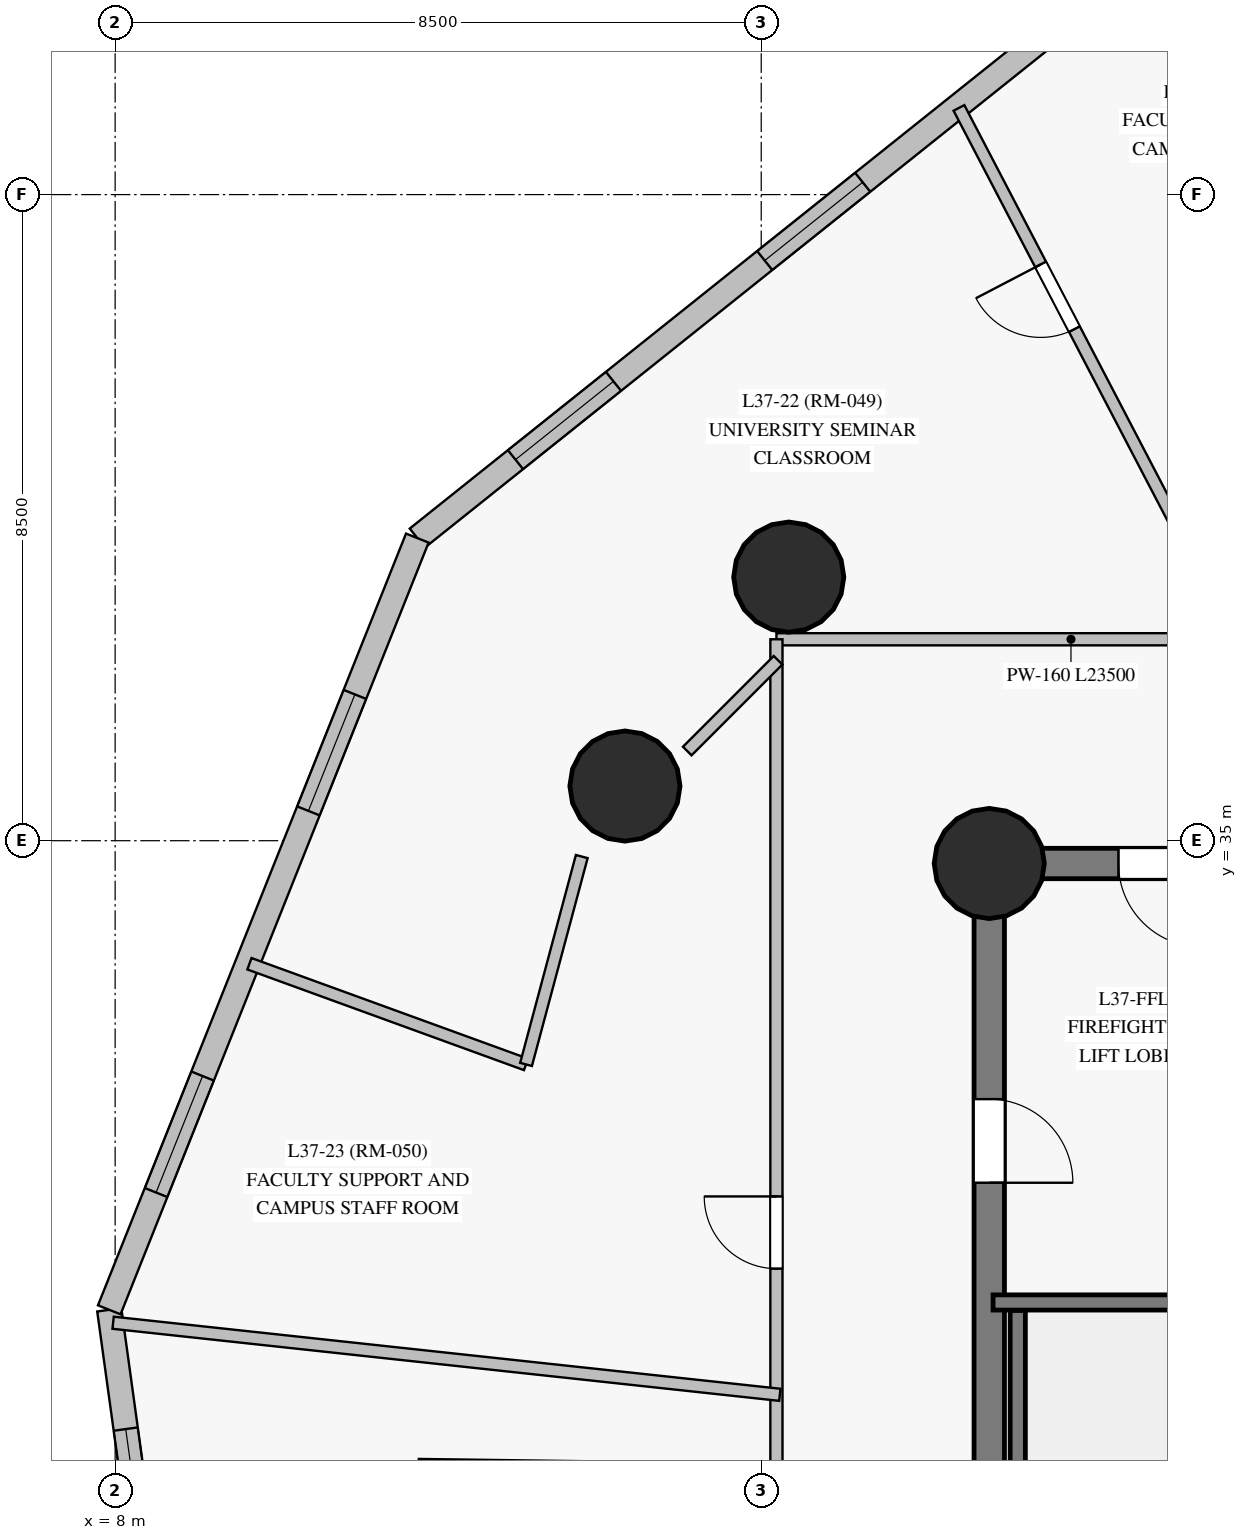
"""IFC4 building model, lengths in metres.
Left out: names, types, materials, properties, quantities, classifications, styles, units other than length and angle.
Written with IfcOpenShell. Run it as: python <this file> out.ifc"""

import sys

from ifc_helpers import new_model, si_unit, direction, frame, frame_2d, origin, origin_with_axes, origin_2d, place, context, subcontext, project, spatial, rectangle, circle, extrude, source, transform, mapped, element, fill, save


model = new_model("IFC4")
c1 = context("Model", 3, precision=1e-05, world=origin(), true_north=direction((0.0, 1.0)))
c2 = subcontext(c1, "Body", "Model", "MODEL_VIEW")
j1 = project(units=[si_unit("LENGTHUNIT", "METRE"), si_unit("PLANEANGLEUNIT", "RADIAN")], contexts=[c1])
p1 = place(None, origin())
s1 = spatial("IfcSite", under=j1, at=p1, CompositionType="ELEMENT")
p2 = place(p1, origin())
s2 = spatial("IfcBuilding", under=s1, at=p2, CompositionType="ELEMENT")
p3 = place(p2, frame((0.0, 0.0, 132.8)))
s3 = spatial("IfcBuildingStorey", under=s2, at=p3, CompositionType="ELEMENT", Elevation=132.8)
p4 = place(p3, frame((26.55, 34.7, 0.0), z_axis=(0.0, 0.0, 1.0), x_axis=(-1.0, 0.0, 0.0)))
e1 = element("IfcWall", 1, at=p4, inside=s3, PredefinedType="SHEAR", context=c2, shape_type="SweptSolid", body=[
    extrude(rectangle(XDim=7.05, YDim=0.4, at=frame_2d((3.525, 0.0))), origin(), (0.0, 0.0, 1.0), 2.825),
])
p5 = place(p4, frame((4.25, 0.0, 0.0)))
e2 = element("IfcOpeningElement", 2, at=p5, cuts=e1, PredefinedType="OPENING", context=c2, shape_type="SweptSolid", body=[
    extrude(rectangle(XDim=1.1, YDim=2.15, at=frame_2d((0.55, 1.075))), frame((0.0, 0.21, 0.0), z_axis=(0.0, -1.0, 0.0), x_axis=(1.0, 0.0, 0.0)), (0.0, 0.0, 1.0), 0.42),
])
p6 = place(p3, frame((19.5, 34.7, 0.0), z_axis=(0.0, 0.0, 1.0), x_axis=(0.0, -1.0, 0.0)))
e3 = element("IfcWall", 3, at=p6, inside=s3, PredefinedType="SHEAR", context=c2, shape_type="SweptSolid", body=[
    extrude(rectangle(XDim=16.4, YDim=0.4, at=frame_2d((8.2, 0.0))), origin(), (0.0, 0.0, 1.0), 2.825),
])
p7 = place(p6, frame((3.1, 0.0, 0.0)))
e4 = element("IfcOpeningElement", 4, at=p7, cuts=e3, PredefinedType="OPENING", context=c2, shape_type="SweptSolid", body=[
    extrude(rectangle(XDim=1.1, YDim=2.15, at=frame_2d((0.55, 1.075))), frame((0.0, 0.21, 0.0), z_axis=(0.0, -1.0, 0.0), x_axis=(1.0, 0.0, 0.0)), (0.0, 0.0, 1.0), 0.42),
])
m1 = source(origin_with_axes(), c2, "Body", "SweptSolid", [
    extrude(circle(Radius=0.725, at=origin_2d()), origin(), (0.0, 0.0, 1.0), 3.05),
])
for number, where, z_axis, x_axis in (
    (5, (19.5, 34.7, 0.0), (0.0, 0.0, 1.0), (1.0, 0.0, 0.0)),
    (6, (16.862, 38.468, 0.0), (0.0, 0.0, 1.0), (1.0, 0.0, 0.0)),
    (7, (14.707, 35.719, 0.0), (0.0, 0.0, 1.0), (1.0, 0.0, 0.0)),
):
    element("IfcColumn", number, at=place(p3, frame(where, z_axis=z_axis, x_axis=x_axis)), inside=s3, PredefinedType="COLUMN", context=c2, shape_type="MappedRepresentation", body=[
        mapped(m1, transform((0.0, 0.0, 0.0), scale=1.0)),
    ])
p8 = place(p3, frame((7.923, 28.828, 0.0), z_axis=(0.0, 0.0, 1.0), x_axis=(0.136771186791, -0.990602666291, 0.0)))
e8 = element("IfcWall", 8, at=p8, inside=s3, PredefinedType="SOLIDWALL", context=c2, shape_type="SweptSolid", body=[
    extrude(rectangle(XDim=13.646, YDim=0.32, at=frame_2d((6.823, 0.0))), origin(), (0.0, 0.0, 1.0), 2.825),
])
p9 = place(p8, frame((1.584, 0.0, 0.85)))
e9 = element("IfcOpeningElement", 9, at=p9, cuts=e8, PredefinedType="OPENING", context=c2, shape_type="SweptSolid", body=[
    extrude(rectangle(XDim=1.65, YDim=1.65, at=frame_2d((0.825, 0.825))), frame((0.0, 0.17, 0.0), z_axis=(0.0, -1.0, 0.0), x_axis=(1.0, 0.0, 0.0)), (0.0, 0.0, 1.0), 0.34),
])
p10 = place(p8, frame((5.394, 0.0, 0.85)))
e10 = element("IfcOpeningElement", 10, at=p10, cuts=e8, PredefinedType="OPENING", context=c2, shape_type="SweptSolid", body=[
    extrude(rectangle(XDim=1.65, YDim=1.65, at=frame_2d((0.825, 0.825))), frame((0.0, 0.17, 0.0), z_axis=(0.0, -1.0, 0.0), x_axis=(1.0, 0.0, 0.0)), (0.0, 0.0, 1.0), 0.34),
])
p11 = place(p8, frame((9.204, 0.0, 0.85)))
e11 = element("IfcOpeningElement", 11, at=p11, cuts=e8, PredefinedType="OPENING", context=c2, shape_type="SweptSolid", body=[
    extrude(rectangle(XDim=1.65, YDim=1.65, at=frame_2d((0.825, 0.825))), frame((0.0, 0.17, 0.0), z_axis=(0.0, -1.0, 0.0), x_axis=(1.0, 0.0, 0.0)), (0.0, 0.0, 1.0), 0.34),
])
p12 = place(p3, frame((22.637, 47.499, 0.0), z_axis=(0.0, 0.0, 1.0), x_axis=(-0.781301477926, -0.624153827667, 0.0)))
e12 = element("IfcWall", 12, at=p12, inside=s3, PredefinedType="SOLIDWALL", context=c2, shape_type="SweptSolid", body=[
    extrude(rectangle(XDim=13.646, YDim=0.32, at=frame_2d((6.823, 0.0))), origin(), (0.0, 0.0, 1.0), 2.825),
])
p13 = place(p12, frame((1.482, 0.0, 0.85)))
e13 = element("IfcOpeningElement", 13, at=p13, cuts=e12, PredefinedType="OPENING", context=c2, shape_type="SweptSolid", body=[
    extrude(rectangle(XDim=1.65, YDim=1.65, at=frame_2d((0.825, 0.825))), frame((0.0, 0.17, 0.0), z_axis=(0.0, -1.0, 0.0), x_axis=(1.0, 0.0, 0.0)), (0.0, 0.0, 1.0), 0.34),
])
p14 = place(p12, frame((6.147, 0.0, 0.85)))
e14 = element("IfcOpeningElement", 14, at=p14, cuts=e12, PredefinedType="OPENING", context=c2, shape_type="SweptSolid", body=[
    extrude(rectangle(XDim=1.65, YDim=1.65, at=frame_2d((0.825, 0.825))), frame((0.0, 0.17, 0.0), z_axis=(0.0, -1.0, 0.0), x_axis=(1.0, 0.0, 0.0)), (0.0, 0.0, 1.0), 0.34),
])
p15 = place(p12, frame((10.343, 0.0, 0.85)))
e15 = element("IfcOpeningElement", 15, at=p15, cuts=e12, PredefinedType="OPENING", context=c2, shape_type="SweptSolid", body=[
    extrude(rectangle(XDim=1.65, YDim=1.65, at=frame_2d((0.825, 0.825))), frame((0.0, 0.17, 0.0), z_axis=(0.0, -1.0, 0.0), x_axis=(1.0, 0.0, 0.0)), (0.0, 0.0, 1.0), 0.34),
])
p16 = place(p3, frame((11.975, 38.981, 0.0), z_axis=(0.0, 0.0, 1.0), x_axis=(-0.370728292026, -0.928741370615, 0.0)))
e16 = element("IfcWall", 16, at=p16, inside=s3, PredefinedType="SOLIDWALL", context=c2, shape_type="SweptSolid", body=[
    extrude(rectangle(XDim=10.932, YDim=0.32, at=frame_2d((5.466, 0.0))), origin(), (0.0, 0.0, 1.0), 2.825),
])
p17 = place(p16, frame((2.215, 0.0, 0.85)))
e17 = element("IfcOpeningElement", 17, at=p17, cuts=e16, PredefinedType="OPENING", context=c2, shape_type="SweptSolid", body=[
    extrude(rectangle(XDim=1.65, YDim=1.65, at=frame_2d((0.825, 0.825))), frame((0.0, 0.17, 0.0), z_axis=(0.0, -1.0, 0.0), x_axis=(1.0, 0.0, 0.0)), (0.0, 0.0, 1.0), 0.34),
])
p18 = place(p16, frame((7.62, 0.0, 0.85)))
e18 = element("IfcOpeningElement", 18, at=p18, cuts=e16, PredefinedType="OPENING", context=c2, shape_type="SweptSolid", body=[
    extrude(rectangle(XDim=1.65, YDim=1.65, at=frame_2d((0.825, 0.825))), frame((0.0, 0.17, 0.0), z_axis=(0.0, -1.0, 0.0), x_axis=(1.0, 0.0, 0.0)), (0.0, 0.0, 1.0), 0.34),
])
p19 = place(p3, frame((19.875, 21.32, 0.0), z_axis=(0.0, 0.0, 1.0), x_axis=(0.0, 1.0, 0.0)))
e19 = element("IfcWall", 19, at=p19, inside=s3, PredefinedType="SHEAR", context=c2, shape_type="SweptSolid", body=[
    extrude(rectangle(XDim=7.5, YDim=0.2, at=frame_2d((3.75, 0.0))), origin(), (0.0, 0.0, 1.0), 2.825),
])
p20 = place(p3, frame((19.55, 28.925, 0.0), z_axis=(0.0, 0.0, 1.0), x_axis=(1.0, 0.0, 0.0)))
e20 = element("IfcWall", 20, at=p20, inside=s3, PredefinedType="SHEAR", context=c2, shape_type="SweptSolid", body=[
    extrude(rectangle(XDim=3.995, YDim=0.2, at=frame_2d((1.998, 0.0))), origin(), (0.0, 0.0, 1.0), 2.825),
])
p21 = place(p3, frame((16.7, 37.65, 0.0), z_axis=(0.0, 0.0, 1.0), x_axis=(1.0, 0.0, 0.0)))
e21 = element("IfcWall", 21, at=p21, inside=s3, PredefinedType="PARTITIONING", context=c2, shape_type="SweptSolid", body=[
    extrude(rectangle(XDim=23.5, YDim=0.16, at=frame_2d((11.75, 0.0))), origin(), (0.0, 0.0, 1.0), 2.325),
])
p22 = place(p21, frame((20.49, 0.0, 0.0)))
e22 = element("IfcOpeningElement", 22, at=p22, cuts=e21, PredefinedType="OPENING", context=c2, shape_type="SweptSolid", body=[
    extrude(rectangle(XDim=0.96, YDim=2.15, at=frame_2d((0.48, 1.075))), frame((0.0, 0.09, 0.0), z_axis=(0.0, -1.0, 0.0), x_axis=(1.0, 0.0, 0.0)), (0.0, 0.0, 1.0), 0.18),
])
p23 = place(p21, frame((17.11, 0.0, 0.0)))
e23 = element("IfcOpeningElement", 23, at=p23, cuts=e21, PredefinedType="OPENING", context=c2, shape_type="SweptSolid", body=[
    extrude(rectangle(XDim=0.95, YDim=2.15, at=frame_2d((0.475, 1.075))), frame((0.0, 0.09, 0.0), z_axis=(0.0, -1.0, 0.0), x_axis=(1.0, 0.0, 0.0)), (0.0, 0.0, 1.0), 0.18),
])
p24 = place(p21, frame((14.71, 0.0, 0.0)))
e24 = element("IfcOpeningElement", 24, at=p24, cuts=e21, PredefinedType="OPENING", context=c2, shape_type="SweptSolid", body=[
    extrude(rectangle(XDim=0.96, YDim=2.15, at=frame_2d((0.48, 1.075))), frame((0.0, 0.09, 0.0), z_axis=(0.0, -1.0, 0.0), x_axis=(1.0, 0.0, 0.0)), (0.0, 0.0, 1.0), 0.18),
])
p25 = place(p21, frame((10.785, 0.0, 0.0)))
e25 = element("IfcOpeningElement", 25, at=p25, cuts=e21, PredefinedType="OPENING", context=c2, shape_type="SweptSolid", body=[
    extrude(rectangle(XDim=0.95, YDim=2.15, at=frame_2d((0.475, 1.075))), frame((0.0, 0.09, 0.0), z_axis=(0.0, -1.0, 0.0), x_axis=(1.0, 0.0, 0.0)), (0.0, 0.0, 1.0), 0.18),
])
p26 = place(p21, frame((7.75, 0.0, 0.0)))
e26 = element("IfcOpeningElement", 26, at=p26, cuts=e21, PredefinedType="OPENING", context=c2, shape_type="SweptSolid", body=[
    extrude(rectangle(XDim=0.95, YDim=2.15, at=frame_2d((0.475, 1.075))), frame((0.0, 0.09, 0.0), z_axis=(0.0, -1.0, 0.0), x_axis=(1.0, 0.0, 0.0)), (0.0, 0.0, 1.0), 0.18),
])
p27 = place(p3, frame((16.7, 15.35, 0.0), z_axis=(0.0, 0.0, 1.0), x_axis=(0.0, 1.0, 0.0)))
e27 = element("IfcWall", 27, at=p27, inside=s3, PredefinedType="PARTITIONING", context=c2, shape_type="SweptSolid", body=[
    extrude(rectangle(XDim=22.3, YDim=0.16, at=frame_2d((11.15, 0.0))), origin(), (0.0, 0.0, 1.0), 2.225),
])
p28 = place(p27, frame((10.135, 0.0, 0.0)))
e28 = element("IfcOpeningElement", 28, at=p28, cuts=e27, PredefinedType="OPENING", context=c2, shape_type="SweptSolid", body=[
    extrude(rectangle(XDim=0.96, YDim=2.15, at=frame_2d((0.48, 1.075))), frame((0.0, 0.09, 0.0), z_axis=(0.0, -1.0, 0.0), x_axis=(1.0, 0.0, 0.0)), (0.0, 0.0, 1.0), 0.18),
])
p29 = place(p27, frame((2.104, 0.0, 0.0)))
e29 = element("IfcOpeningElement", 29, at=p29, cuts=e27, PredefinedType="OPENING", context=c2, shape_type="SweptSolid", body=[
    extrude(rectangle(XDim=0.95, YDim=2.15, at=frame_2d((0.475, 1.075))), frame((0.0, 0.09, 0.0), z_axis=(0.0, -1.0, 0.0), x_axis=(1.0, 0.0, 0.0)), (0.0, 0.0, 1.0), 0.18),
])
p30 = place(p27, frame((14.02, 0.0, 0.0)))
e30 = element("IfcOpeningElement", 30, at=p30, cuts=e27, PredefinedType="OPENING", context=c2, shape_type="SweptSolid", body=[
    extrude(rectangle(XDim=0.95, YDim=2.15, at=frame_2d((0.475, 1.075))), frame((0.0, 0.09, 0.0), z_axis=(0.0, -1.0, 0.0), x_axis=(1.0, 0.0, 0.0)), (0.0, 0.0, 1.0), 0.18),
])
p31 = place(p3, frame((7.973, 28.658, 0.0), z_axis=(0.0, 0.0, 1.0), x_axis=(0.994210323824, -0.107451533272, 0.0)))
e31 = element("IfcWall", 31, at=p31, inside=s3, PredefinedType="PARTITIONING", context=c2, shape_type="SweptSolid", body=[
    extrude(rectangle(XDim=8.823, YDim=0.16, at=frame_2d((4.411, 0.0))), origin(), (0.0, 0.0, 1.0), 2.825),
])
p32 = place(p3, frame((22.77, 37.61, 0.0), z_axis=(0.0, 0.0, 1.0), x_axis=(-0.462638604279, 0.886546965384, 0.0)))
e32 = element("IfcWall", 32, at=p32, inside=s3, PredefinedType="PARTITIONING", context=c2, shape_type="SweptSolid", body=[
    extrude(rectangle(XDim=7.93, YDim=0.16, at=frame_2d((3.965, 0.0))), origin(), (0.0, 0.0, 1.0), 2.825),
])
p33 = place(p32, frame((4.647, 0.0, 0.0)))
e33 = element("IfcOpeningElement", 33, at=p33, cuts=e32, PredefinedType="OPENING", context=c2, shape_type="SweptSolid", body=[
    extrude(rectangle(XDim=0.96, YDim=2.15, at=frame_2d((0.48, 1.075))), frame((0.0, 0.09, 0.0), z_axis=(0.0, -1.0, 0.0), x_axis=(1.0, 0.0, 0.0)), (0.0, 0.0, 1.0), 0.18),
])
p34 = place(p3, frame((16.73, 26.722, 0.0), z_axis=(0.0, 0.0, 1.0), x_axis=(-0.999906003138, 0.013710758123, 0.0)))
e34 = element("IfcWall", 34, at=p34, inside=s3, PredefinedType="PARTITIONING", context=c2, shape_type="SweptSolid", body=[
    extrude(rectangle(XDim=4.737, YDim=0.16, at=frame_2d((2.368, 0.0))), origin(), (0.0, 0.0, 1.0), 2.825),
])
p35 = place(p3, frame((13.406, 32.057, 0.0), z_axis=(0.0, 0.0, 1.0), x_axis=(-0.939699515727, 0.342001199035, 0.0)))
e35 = element("IfcWall", 35, at=p35, inside=s3, PredefinedType="PARTITIONING", context=c2, shape_type="SweptSolid", body=[
    extrude(rectangle(XDim=3.873, YDim=0.16, at=frame_2d((1.937, 0.0))), origin(), (0.0, 0.0, 1.0), 2.825),
])
p36 = place(p3, frame((14.139, 34.792, 0.0), z_axis=(0.0, 0.0, 1.0), x_axis=(-0.258853892004, -0.965916488416, 0.0)))
e36 = element("IfcWall", 36, at=p36, inside=s3, PredefinedType="PARTITIONING", context=c2, shape_type="SweptSolid", body=[
    extrude(rectangle(XDim=2.831, YDim=0.16, at=frame_2d((1.416, 0.0))), origin(), (0.0, 0.0, 1.0), 2.225),
])
p37 = place(p3, frame((16.721, 37.374, 0.0), z_axis=(0.0, 0.0, 1.0), x_axis=(-0.707034498357, -0.707179056627, 0.0)))
e37 = element("IfcWall", 37, at=p37, inside=s3, PredefinedType="PARTITIONING", context=c2, shape_type="SweptSolid", body=[
    extrude(rectangle(XDim=1.689, YDim=0.16, at=frame_2d((0.844, 0.0))), origin(), (0.0, 0.0, 1.0), 2.225),
])
m2 = source(origin_with_axes(), c2, "Body", "SweptSolid", [
    extrude(rectangle(XDim=1.65, YDim=1.65, at=frame_2d((0.825, 0.825))), frame((0.0, 0.03, 0.0), z_axis=(0.0, -1.0, 0.0), x_axis=(1.0, 0.0, 0.0)), (0.0, 0.0, 1.0), 0.06),
])
p38 = place(p9, origin())
e38 = element("IfcWindow", 38, at=p38, inside=s3, PartitioningType="SINGLE_PANEL", PredefinedType="WINDOW", context=c2, shape_type="MappedRepresentation", body=[
    mapped(m2, transform((0.0, 0.0, 0.0), scale=1.0)),
])
fill(e9, e38)
p39 = place(p14, origin())
e39 = element("IfcWindow", 39, at=p39, inside=s3, PartitioningType="SINGLE_PANEL", PredefinedType="WINDOW", context=c2, shape_type="MappedRepresentation", body=[
    mapped(m2, transform((0.0, 0.0, 0.0), scale=1.0)),
])
fill(e14, e39)
p40 = place(p15, origin())
e40 = element("IfcWindow", 40, at=p40, inside=s3, PartitioningType="SINGLE_PANEL", PredefinedType="WINDOW", context=c2, shape_type="MappedRepresentation", body=[
    mapped(m2, transform((0.0, 0.0, 0.0), scale=1.0)),
])
fill(e15, e40)
p41 = place(p17, origin())
e41 = element("IfcWindow", 41, at=p41, inside=s3, PartitioningType="SINGLE_PANEL", PredefinedType="WINDOW", context=c2, shape_type="MappedRepresentation", body=[
    mapped(m2, transform((0.0, 0.0, 0.0), scale=1.0)),
])
fill(e17, e41)
p42 = place(p18, origin())
e42 = element("IfcWindow", 42, at=p42, inside=s3, PartitioningType="SINGLE_PANEL", PredefinedType="WINDOW", context=c2, shape_type="MappedRepresentation", body=[
    mapped(m2, transform((0.0, 0.0, 0.0), scale=1.0)),
])
fill(e18, e42)
m3 = source(origin_with_axes(), c2, "Body", "SweptSolid", [
    extrude(rectangle(XDim=1.1, YDim=2.15, at=frame_2d((0.55, 1.075))), frame((0.0, 0.025, 0.0), z_axis=(0.0, -1.0, 0.0), x_axis=(1.0, 0.0, 0.0)), (0.0, 0.0, 1.0), 0.05),
])
p43 = place(p5, origin())
e43 = element("IfcDoor", 43, at=p43, inside=s3, OperationType="SINGLE_SWING_LEFT", PredefinedType="DOOR", context=c2, shape_type="MappedRepresentation", body=[
    mapped(m3, transform((0.0, 0.0, 0.0), scale=1.0)),
])
fill(e2, e43)
p44 = place(p7, origin())
e44 = element("IfcDoor", 44, at=p44, inside=s3, OperationType="SINGLE_SWING_RIGHT", PredefinedType="DOOR", context=c2, shape_type="MappedRepresentation", body=[
    mapped(m3, transform((0.0, 0.0, 0.0), scale=1.0)),
])
fill(e4, e44)
m4 = source(origin_with_axes(), c2, "Body", "SweptSolid", [
    extrude(rectangle(XDim=0.95, YDim=2.15, at=frame_2d((0.475, 1.075))), frame((0.0, 0.025, 0.0), z_axis=(0.0, -1.0, 0.0), x_axis=(1.0, 0.0, 0.0)), (0.0, 0.0, 1.0), 0.05),
])
p45 = place(p30, origin())
e45 = element("IfcDoor", 45, at=p45, inside=s3, OperationType="SINGLE_SWING_RIGHT", PredefinedType="DOOR", context=c2, shape_type="MappedRepresentation", body=[
    mapped(m4, transform((0.0, 0.0, 0.0), scale=1.0)),
])
fill(e30, e45)
m5 = source(origin_with_axes(), c2, "Body", "SweptSolid", [
    extrude(rectangle(XDim=0.96, YDim=2.15, at=frame_2d((0.48, 1.075))), frame((0.0, 0.025, 0.0), z_axis=(0.0, -1.0, 0.0), x_axis=(1.0, 0.0, 0.0)), (0.0, 0.0, 1.0), 0.05),
])
p46 = place(p33, origin())
e46 = element("IfcDoor", 46, at=p46, inside=s3, OperationType="SINGLE_SWING_RIGHT", PredefinedType="DOOR", context=c2, shape_type="MappedRepresentation", body=[
    mapped(m5, transform((0.0, 0.0, 0.0), scale=1.0)),
])
fill(e33, e46)
save(model, sys.argv[1])
